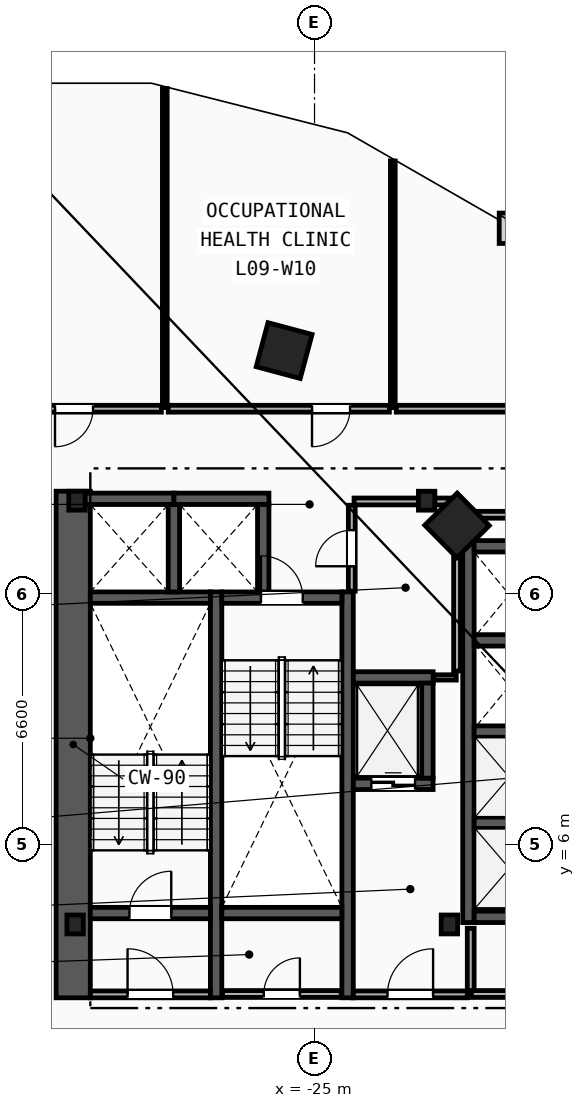
"""IFC4 building model, lengths in metres.
Left out: names, types, materials, properties, quantities, classifications, styles, units other than length and angle.
Written with IfcOpenShell. Run it as: python <this file> out.ifc"""

import sys

from ifc_helpers import new_model, si_unit, direction, frame, frame_2d, origin, origin_2d, place, context, subcontext, project, spatial, rectangle, i_section, extrude, element, fill, save


model = new_model("IFC4")
c1 = context("Model", 3, precision=1e-05, world=origin(), true_north=direction((0.0, 1.0)))
c2 = subcontext(c1, "Body", "Model", "MODEL_VIEW")
j1 = project(units=[si_unit("LENGTHUNIT", "METRE"), si_unit("PLANEANGLEUNIT", "RADIAN")], contexts=[c1])
p1 = place(None, origin())
s1 = spatial("IfcSite", under=j1, at=p1, CompositionType="ELEMENT")
p2 = place(p1, origin())
s2 = spatial("IfcBuilding", under=s1, at=p2, CompositionType="ELEMENT")
p3 = place(p2, frame((0.0, 0.0, 39.2)))
s3 = spatial("IfcBuildingStorey", under=s2, at=p3, CompositionType="ELEMENT", Elevation=39.2)
for number, where, z_axis, x_axis in (
    (1, (-31.3, 3.9, 0.0), (0.0, 0.0, 1.0), (1.0, 0.0, 0.0)),
    (2, (-21.45, 3.9, 0.0), (0.0, 0.0, 1.0), (1.0, 0.0, 0.0)),
    (3, (-22.05, 15.05, 0.0), (0.0, 0.0, 1.0), (1.0, 0.0, 0.0)),
    (4, (-31.25, 15.05, 0.0), (0.0, 0.0, 1.0), (1.0, 0.0, 0.0)),
):
    element("IfcColumn", number, at=place(p3, frame(where, z_axis=z_axis, x_axis=x_axis)), inside=s3, PredefinedType="COLUMN", context=c2, shape_type="SweptSolid", body=[
        extrude(i_section(OverallWidth=0.432, OverallDepth=0.498, WebThickness=0.056, FlangeThickness=0.089, FilletRadius=0.018, at=origin_2d()), origin(), (0.0, 0.0, 1.0), 3.8),
    ])
for number, where, z_axis, x_axis in (
    (5, (-21.25, 14.4, 0.0), (0.0, 0.0, 1.0), (-0.703, 0.711, 0.0)),
    (6, (-25.8, 19.0, 0.0), (0.0, 0.0, 1.0), (-0.966, 0.259, 0.0)),
):
    element("IfcColumn", number, at=place(p3, frame(where, z_axis=z_axis, x_axis=x_axis)), inside=s3, PredefinedType="COLUMN", context=c2, shape_type="SweptSolid", body=[
        extrude(rectangle(XDim=1.2, YDim=1.2, at=origin_2d()), origin(), (0.0, 0.0, 1.0), 3.8),
    ])
p4 = place(p3, frame((-31.35, 1.97, 0.0), z_axis=(0.0, 0.0, 1.0), x_axis=(0.0, 1.0, 0.0)))
e7 = element("IfcWall", 7, at=p4, inside=s3, PredefinedType="SHEAR", context=c2, shape_type="SweptSolid", body=[
    extrude(rectangle(XDim=13.33, YDim=0.9, at=frame_2d((6.665, 0.0))), origin(), (0.0, 0.0, 1.0), 3.5),
])
for number, where, z_axis, x_axis in (
    (8, (-27.59, 1.97, 0.0), (0.0, 0.0, 1.0), (0.0, 1.0, 0.0)),
    (9, (-24.13, 1.97, 0.0), (0.0, 0.0, 1.0), (0.0, 1.0, 0.0)),
):
    element("IfcWall", number, at=place(p3, frame(where, z_axis=z_axis, x_axis=x_axis)), inside=s3, PredefinedType="SHEAR", context=c2, shape_type="SweptSolid", body=[
        extrude(rectangle(XDim=10.68, YDim=0.3, at=frame_2d((5.34, 0.0))), origin(), (0.0, 0.0, 1.0), 3.5),
    ])
p5 = place(p3, frame((-30.9, 4.2, 0.0), z_axis=(0.0, 0.0, 1.0), x_axis=(1.0, 0.0, 0.0)))
e10 = element("IfcWall", 10, at=p5, inside=s3, PredefinedType="SHEAR", context=c2, shape_type="SweptSolid", body=[
    extrude(rectangle(XDim=3.16, YDim=0.3, at=frame_2d((1.58, 0.0))), origin(), (0.0, 0.0, 1.0), 3.5),
])
p6 = place(p5, frame((1.03, 0.0, 0.0)))
e11 = element("IfcOpeningElement", 11, at=p6, cuts=e10, PredefinedType="OPENING", context=c2, shape_type="SweptSolid", body=[
    extrude(rectangle(XDim=1.1, YDim=2.15, at=frame_2d((0.55, 1.075))), frame((0.0, 0.16, 0.0), z_axis=(0.0, -1.0, 0.0), x_axis=(1.0, 0.0, 0.0)), (0.0, 0.0, 1.0), 0.32),
])
p7 = place(p3, frame((-30.9, 12.5, 0.0), z_axis=(0.0, 0.0, 1.0), x_axis=(1.0, 0.0, 0.0)))
e12 = element("IfcWall", 12, at=p7, inside=s3, PredefinedType="SHEAR", context=c2, shape_type="SweptSolid", body=[
    extrude(rectangle(XDim=3.16, YDim=0.3, at=frame_2d((1.58, 0.0))), origin(), (0.0, 0.0, 1.0), 3.5),
])
p8 = place(p3, frame((-27.44, 12.5, 0.0), z_axis=(0.0, 0.0, 1.0), x_axis=(1.0, 0.0, 0.0)))
e13 = element("IfcWall", 13, at=p8, inside=s3, PredefinedType="SHEAR", context=c2, shape_type="SweptSolid", body=[
    extrude(rectangle(XDim=3.16, YDim=0.3, at=frame_2d((1.58, 0.0))), origin(), (0.0, 0.0, 1.0), 3.5),
])
p9 = place(p8, frame((1.03, 0.0, 0.0)))
e14 = element("IfcOpeningElement", 14, at=p9, cuts=e13, PredefinedType="OPENING", context=c2, shape_type="SweptSolid", body=[
    extrude(rectangle(XDim=1.1, YDim=2.15, at=frame_2d((0.55, 1.075))), frame((0.0, 0.16, 0.0), z_axis=(0.0, -1.0, 0.0), x_axis=(1.0, 0.0, 0.0)), (0.0, 0.0, 1.0), 0.32),
])
p10 = place(p3, frame((-27.44, 4.2, 0.0), z_axis=(0.0, 0.0, 1.0), x_axis=(1.0, 0.0, 0.0)))
e15 = element("IfcWall", 15, at=p10, inside=s3, PredefinedType="SHEAR", context=c2, shape_type="SweptSolid", body=[
    extrude(rectangle(XDim=3.16, YDim=0.3, at=frame_2d((1.58, 0.0))), origin(), (0.0, 0.0, 1.0), 3.5),
])
p11 = place(p3, frame((-20.89, 2.15, 0.0), z_axis=(0.0, 0.0, 1.0), x_axis=(0.0, 1.0, 0.0)))
e16 = element("IfcWall", 16, at=p11, inside=s3, PredefinedType="PARTITIONING", context=c2, shape_type="SweptSolid", body=[
    extrude(rectangle(XDim=1.65, YDim=0.18, at=frame_2d((0.825, 0.0))), origin(), (0.0, 0.0, 1.0), 3.5),
])
p12 = place(p3, frame((-23.98, 2.06, 0.0), z_axis=(0.0, 0.0, 1.0), x_axis=(1.0, 0.0, 0.0)))
e17 = element("IfcWall", 17, at=p12, inside=s3, PredefinedType="PARTITIONING", context=c2, shape_type="SweptSolid", body=[
    extrude(rectangle(XDim=3.0, YDim=0.18, at=frame_2d((1.5, 0.0))), origin(), (0.0, 0.0, 1.0), 3.5),
])
p13 = place(p12, frame((0.9, 0.0, 0.0)))
e18 = element("IfcOpeningElement", 18, at=p13, cuts=e17, PredefinedType="OPENING", context=c2, shape_type="SweptSolid", body=[
    extrude(rectangle(XDim=1.2, YDim=2.15, at=frame_2d((0.6, 1.075))), frame((0.0, 0.1, 0.0), z_axis=(0.0, -1.0, 0.0), x_axis=(1.0, 0.0, 0.0)), (0.0, 0.0, 1.0), 0.2),
])
p14 = place(p3, frame((-30.9, 2.06, 0.0), z_axis=(0.0, 0.0, 1.0), x_axis=(1.0, 0.0, 0.0)))
e19 = element("IfcWall", 19, at=p14, inside=s3, PredefinedType="PARTITIONING", context=c2, shape_type="SweptSolid", body=[
    extrude(rectangle(XDim=3.16, YDim=0.18, at=frame_2d((1.58, 0.0))), origin(), (0.0, 0.0, 1.0), 3.5),
])
p15 = place(p14, frame((0.98, 0.0, 0.0)))
e20 = element("IfcOpeningElement", 20, at=p15, cuts=e19, PredefinedType="OPENING", context=c2, shape_type="SweptSolid", body=[
    extrude(rectangle(XDim=1.2, YDim=2.15, at=frame_2d((0.6, 1.075))), frame((0.0, 0.1, 0.0), z_axis=(0.0, -1.0, 0.0), x_axis=(1.0, 0.0, 0.0)), (0.0, 0.0, 1.0), 0.2),
])
p16 = place(p3, frame((-23.98, 7.6, 0.0), z_axis=(0.0, 0.0, 1.0), x_axis=(1.0, 0.0, 0.0)))
e21 = element("IfcWall", 21, at=p16, inside=s3, PredefinedType="SHEAR", context=c2, shape_type="SweptSolid", body=[
    extrude(rectangle(XDim=2.1, YDim=0.3, at=frame_2d((1.05, 0.0))), origin(), (0.0, 0.0, 1.0), 3.5),
])
p17 = place(p16, frame((0.475, 0.0, 0.0)))
e22 = element("IfcOpeningElement", 22, at=p17, cuts=e21, PredefinedType="OPENING", context=c2, shape_type="SweptSolid", body=[
    extrude(rectangle(XDim=1.15, YDim=2.2, at=frame_2d((0.575, 1.1))), frame((0.0, 0.16, 0.0), z_axis=(0.0, -1.0, 0.0), x_axis=(1.0, 0.0, 0.0)), (0.0, 0.0, 1.0), 0.32),
])
p18 = place(p3, frame((-23.98, 10.4, 0.0), z_axis=(0.0, 0.0, 1.0), x_axis=(1.0, 0.0, 0.0)))
e23 = element("IfcWall", 23, at=p18, inside=s3, PredefinedType="SHEAR", context=c2, shape_type="SweptSolid", body=[
    extrude(rectangle(XDim=2.1, YDim=0.3, at=frame_2d((1.05, 0.0))), origin(), (0.0, 0.0, 1.0), 3.5),
])
for number, where, z_axis, x_axis in (
    (24, (-22.03, 7.75, 0.0), (0.0, 0.0, 1.0), (0.0, 1.0, 0.0)),
    (25, (-31.2, 15.1, 0.0), (0.0, 0.0, 1.0), (1.0, 0.0, 0.0)),
):
    element("IfcWall", number, at=place(p3, frame(where, z_axis=z_axis, x_axis=x_axis)), inside=s3, PredefinedType="SHEAR", context=c2, shape_type="SweptSolid", body=[
        extrude(rectangle(XDim=2.5, YDim=0.3, at=frame_2d((1.25, 0.0))), origin(), (0.0, 0.0, 1.0), 3.5),
    ])
p19 = place(p3, frame((-28.7, 12.65, 0.0), z_axis=(0.0, 0.0, 1.0), x_axis=(0.0, 1.0, 0.0)))
e26 = element("IfcWall", 26, at=p19, inside=s3, PredefinedType="SHEAR", context=c2, shape_type="SweptSolid", body=[
    extrude(rectangle(XDim=2.3, YDim=0.3, at=frame_2d((1.15, 0.0))), origin(), (0.0, 0.0, 1.0), 3.5),
])
p20 = place(p3, frame((-28.7, 15.1, 0.0), z_axis=(0.0, 0.0, 1.0), x_axis=(1.0, 0.0, 0.0)))
e27 = element("IfcWall", 27, at=p20, inside=s3, PredefinedType="SHEAR", context=c2, shape_type="SweptSolid", body=[
    extrude(rectangle(XDim=2.5, YDim=0.3, at=frame_2d((1.25, 0.0))), origin(), (0.0, 0.0, 1.0), 3.5),
])
p21 = place(p3, frame((-26.35, 12.65, 0.0), z_axis=(0.0, 0.0, 1.0), x_axis=(0.0, 1.0, 0.0)))
e28 = element("IfcWall", 28, at=p21, inside=s3, PredefinedType="SHEAR", context=c2, shape_type="SweptSolid", body=[
    extrude(rectangle(XDim=2.3, YDim=0.3, at=frame_2d((1.15, 0.0))), origin(), (0.0, 0.0, 1.0), 3.5),
])
p22 = place(p3, frame((-20.95, 3.95, 0.0), z_axis=(0.0, 0.0, 1.0), x_axis=(0.0, 1.0, 0.0)))
e29 = element("IfcWall", 29, at=p22, inside=s3, PredefinedType="SHEAR", context=c2, shape_type="SweptSolid", body=[
    extrude(rectangle(XDim=10.05, YDim=0.3, at=frame_2d((5.025, 0.0))), origin(), (0.0, 0.0, 1.0), 3.5),
])
for number, where, z_axis, x_axis in (
    (30, (-20.8, 4.1, 0.0), (0.0, 0.0, 1.0), (1.0, 0.0, 0.0)),
    (31, (-20.8, 13.85, 0.0), (0.0, 0.0, 1.0), (1.0, 0.0, 0.0)),
):
    element("IfcWall", number, at=place(p3, frame(where, z_axis=z_axis, x_axis=x_axis)), inside=s3, PredefinedType="SHEAR", context=c2, shape_type="SweptSolid", body=[
        extrude(rectangle(XDim=2.15, YDim=0.3, at=frame_2d((1.075, 0.0))), origin(), (0.0, 0.0, 1.0), 3.5),
    ])
for number, where, z_axis, x_axis in (
    (32, (-20.8, 6.575, 0.0), (0.0, 0.0, 1.0), (1.0, 0.0, 0.0)),
    (33, (-20.8, 8.975, 0.0), (0.0, 0.0, 1.0), (1.0, 0.0, 0.0)),
    (34, (-20.8, 11.375, 0.0), (0.0, 0.0, 1.0), (1.0, 0.0, 0.0)),
):
    element("IfcWall", number, at=place(p3, frame(where, z_axis=z_axis, x_axis=x_axis)), inside=s3, PredefinedType="SHEAR", context=c2, shape_type="SweptSolid", body=[
        extrude(rectangle(XDim=1.85, YDim=0.3, at=frame_2d((0.925, 0.0))), origin(), (0.0, 0.0, 1.0), 3.5),
    ])
p23 = place(p3, frame((-20.87, 2.07, 0.0), z_axis=(0.0, 0.0, 1.0), x_axis=(1.0, 0.0, 0.0)))
e35 = element("IfcWall", 35, at=p23, inside=s3, PredefinedType="PARTITIONING", context=c2, shape_type="SweptSolid", body=[
    extrude(rectangle(XDim=3.83, YDim=0.18, at=frame_2d((1.915, 0.0))), origin(), (0.0, 0.0, 1.0), 3.5),
])
p24 = place(p23, frame((1.44, 0.0, 0.0)))
e36 = element("IfcOpeningElement", 36, at=p24, cuts=e35, PredefinedType="OPENING", context=c2, shape_type="SweptSolid", body=[
    extrude(rectangle(XDim=0.95, YDim=2.1, at=frame_2d((0.475, 1.05))), frame((0.0, 0.1, 0.0), z_axis=(0.0, -1.0, 0.0), x_axis=(1.0, 0.0, 0.0)), (0.0, 0.0, 1.0), 0.2),
])
p25 = place(p3, frame((-21.86, 10.4, 0.0), z_axis=(0.0, 0.0, 1.0), x_axis=(1.0, 0.0, 0.0)))
e37 = element("IfcWall", 37, at=p25, inside=s3, PredefinedType="PARTITIONING", context=c2, shape_type="SweptSolid", body=[
    extrude(rectangle(XDim=0.59, YDim=0.14, at=frame_2d((0.295, 0.0))), origin(), (0.0, 0.0, 1.0), 3.5),
])
p26 = place(p3, frame((-21.25, 10.57, 0.0), z_axis=(0.0, 0.0, 1.0), x_axis=(0.0, 1.0, 0.0)))
e38 = element("IfcWall", 38, at=p26, inside=s3, PredefinedType="PARTITIONING", context=c2, shape_type="SweptSolid", body=[
    extrude(rectangle(XDim=4.36, YDim=0.18, at=frame_2d((2.18, 0.0))), origin(), (0.0, 0.0, 1.0), 3.5),
])
p27 = place(p3, frame((-23.96, 15.03, 0.0), z_axis=(0.0, 0.0, 1.0), x_axis=(1.0, 0.0, 0.0)))
e39 = element("IfcWall", 39, at=p27, inside=s3, PredefinedType="PARTITIONING", context=c2, shape_type="SweptSolid", body=[
    extrude(rectangle(XDim=2.61, YDim=0.18, at=frame_2d((1.305, 0.0))), origin(), (0.0, 0.0, 1.0), 2.573),
])
p28 = place(p3, frame((-27.42, 2.07, 0.0), z_axis=(0.0, 0.0, 1.0), x_axis=(1.0, 0.0, 0.0)))
e40 = element("IfcWall", 40, at=p28, inside=s3, PredefinedType="PARTITIONING", context=c2, shape_type="SweptSolid", body=[
    extrude(rectangle(XDim=3.12, YDim=0.18, at=frame_2d((1.56, 0.0))), origin(), (0.0, 0.0, 1.0), 3.5),
])
p29 = place(p28, frame((1.085, 0.0, 0.0)))
e41 = element("IfcOpeningElement", 41, at=p29, cuts=e40, PredefinedType="OPENING", context=c2, shape_type="SweptSolid", body=[
    extrude(rectangle(XDim=0.95, YDim=2.1, at=frame_2d((0.475, 1.05))), frame((0.0, 0.1, 0.0), z_axis=(0.0, -1.0, 0.0), x_axis=(1.0, 0.0, 0.0)), (0.0, 0.0, 1.0), 0.2),
])
p30 = place(p3, frame((-24.02, 12.67, 0.0), z_axis=(0.0, 0.0, 1.0), x_axis=(0.0, 1.0, 0.0)))
e42 = element("IfcWall", 42, at=p30, inside=s3, PredefinedType="PARTITIONING", context=c2, shape_type="SweptSolid", body=[
    extrude(rectangle(XDim=2.26, YDim=0.18, at=frame_2d((1.13, 0.0))), origin(), (0.0, 0.0, 1.0), 3.5),
])
p31 = place(p30, frame((0.655, 0.0, 0.0)))
e43 = element("IfcOpeningElement", 43, at=p31, cuts=e42, PredefinedType="OPENING", context=c2, shape_type="SweptSolid", body=[
    extrude(rectangle(XDim=0.95, YDim=2.1, at=frame_2d((0.475, 1.05))), frame((0.0, 0.1, 0.0), z_axis=(0.0, -1.0, 0.0), x_axis=(1.0, 0.0, 0.0)), (0.0, 0.0, 1.0), 0.2),
])
p32 = place(p3, frame((-28.94, 17.5, 0.0), z_axis=(0.0, 0.0, 1.0), x_axis=(0.0, 1.0, 0.0)))
e44 = element("IfcWall", 44, at=p32, inside=s3, PredefinedType="PARTITIONING", context=c2, shape_type="SweptSolid", body=[
    extrude(rectangle(XDim=8.395, YDim=0.125, at=frame_2d((4.197, 0.0))), origin(), (0.0, 0.0, 1.0), 3.5),
])
p33 = place(p3, frame((-22.94, 17.5, 0.0), z_axis=(0.0, 0.0, 1.0), x_axis=(0.0, 1.0, 0.0)))
e45 = element("IfcWall", 45, at=p33, inside=s3, PredefinedType="PARTITIONING", context=c2, shape_type="SweptSolid", body=[
    extrude(rectangle(XDim=6.49, YDim=0.125, at=frame_2d((3.245, 0.0))), origin(), (0.0, 0.0, 1.0), 3.5),
])
p34 = place(p3, frame((-16.822, 17.47, 0.0), z_axis=(0.0, 0.0, 1.0), x_axis=(-1.0, 0.0, 0.0)))
e46 = element("IfcWall", 46, at=p34, inside=s3, PredefinedType="PARTITIONING", context=c2, shape_type="SweptSolid", body=[
    extrude(rectangle(XDim=6.029, YDim=0.18, at=frame_2d((3.014, 0.0))), origin(), (0.0, 0.0, 1.0), 3.5),
])
p35 = place(p3, frame((-21.178, 14.68, 0.0), z_axis=(0.0, 0.0, 1.0), x_axis=(1.0, 0.0, 0.0)))
e47 = element("IfcWall", 47, at=p35, inside=s3, PredefinedType="PARTITIONING", context=c2, shape_type="SweptSolid", body=[
    extrude(rectangle(XDim=4.357, YDim=0.18, at=frame_2d((2.178, 0.0))), origin(), (0.0, 0.0, 1.0), 3.5),
])
p36 = place(p3, frame((-29.03, 17.47, 0.0), z_axis=(0.0, 0.0, 1.0), x_axis=(-1.0, 0.0, 0.0)))
e48 = element("IfcWall", 48, at=p36, inside=s3, PredefinedType="PARTITIONING", context=c2, shape_type="SweptSolid", body=[
    extrude(rectangle(XDim=4.598, YDim=0.18, at=frame_2d((2.299, 0.0))), origin(), (0.0, 0.0, 1.0), 3.5),
])
p37 = place(p36, frame((1.799, 0.0, 0.0)))
e49 = element("IfcOpeningElement", 49, at=p37, cuts=e48, PredefinedType="OPENING", context=c2, shape_type="SweptSolid", body=[
    extrude(rectangle(XDim=1.0, YDim=2.15, at=frame_2d((0.5, 1.075))), frame((0.0, 0.1, 0.0), z_axis=(0.0, -1.0, 0.0), x_axis=(1.0, 0.0, 0.0)), (0.0, 0.0, 1.0), 0.2),
])
p38 = place(p3, frame((-23.03, 17.47, 0.0), z_axis=(0.0, 0.0, 1.0), x_axis=(-1.0, 0.0, 0.0)))
e50 = element("IfcWall", 50, at=p38, inside=s3, PredefinedType="PARTITIONING", context=c2, shape_type="SweptSolid", body=[
    extrude(rectangle(XDim=5.82, YDim=0.18, at=frame_2d((2.91, 0.0))), origin(), (0.0, 0.0, 1.0), 3.5),
])
p39 = place(p38, frame((1.036, 0.0, 0.0)))
e51 = element("IfcOpeningElement", 51, at=p39, cuts=e50, PredefinedType="OPENING", context=c2, shape_type="SweptSolid", body=[
    extrude(rectangle(XDim=1.0, YDim=2.15, at=frame_2d((0.5, 1.075))), frame((0.0, 0.1, 0.0), z_axis=(0.0, -1.0, 0.0), x_axis=(1.0, 0.0, 0.0)), (0.0, 0.0, 1.0), 0.2),
])
p40 = place(p6, origin())
e52 = element("IfcDoor", 52, at=p40, inside=s3, OperationType="SINGLE_SWING_RIGHT", PredefinedType="DOOR", context=c2, shape_type="SweptSolid", body=[
    extrude(rectangle(XDim=1.1, YDim=2.15, at=frame_2d((0.55, 1.075))), frame((0.0, 0.025, 0.0), z_axis=(0.0, -1.0, 0.0), x_axis=(1.0, 0.0, 0.0)), (0.0, 0.0, 1.0), 0.05),
])
fill(e11, e52)
p41 = place(p9, origin())
e53 = element("IfcDoor", 53, at=p41, inside=s3, OperationType="SINGLE_SWING_LEFT", PredefinedType="DOOR", context=c2, shape_type="SweptSolid", body=[
    extrude(rectangle(XDim=1.1, YDim=2.15, at=frame_2d((0.55, 1.075))), frame((0.0, 0.025, 0.0), z_axis=(0.0, -1.0, 0.0), x_axis=(1.0, 0.0, 0.0)), (0.0, 0.0, 1.0), 0.05),
])
fill(e14, e53)
p42 = place(p13, origin())
e54 = element("IfcDoor", 54, at=p42, inside=s3, OperationType="SINGLE_SWING_RIGHT", PredefinedType="DOOR", context=c2, shape_type="SweptSolid", body=[
    extrude(rectangle(XDim=1.2, YDim=2.15, at=frame_2d((0.6, 1.075))), frame((0.0, 0.025, 0.0), z_axis=(0.0, -1.0, 0.0), x_axis=(1.0, 0.0, 0.0)), (0.0, 0.0, 1.0), 0.05),
])
fill(e18, e54)
p43 = place(p15, origin())
e55 = element("IfcDoor", 55, at=p43, inside=s3, OperationType="SINGLE_SWING_LEFT", PredefinedType="DOOR", context=c2, shape_type="SweptSolid", body=[
    extrude(rectangle(XDim=1.2, YDim=2.15, at=frame_2d((0.6, 1.075))), frame((0.0, 0.025, 0.0), z_axis=(0.0, -1.0, 0.0), x_axis=(1.0, 0.0, 0.0)), (0.0, 0.0, 1.0), 0.05),
])
fill(e20, e55)
p44 = place(p17, origin())
e56 = element("IfcDoor", 56, at=p44, inside=s3, OperationType="SLIDING_TO_LEFT", PredefinedType="TRAPDOOR", context=c2, shape_type="SweptSolid", body=[
    extrude(rectangle(XDim=1.15, YDim=2.2, at=frame_2d((0.575, 1.1))), frame((0.0, 0.025, 0.0), z_axis=(0.0, -1.0, 0.0), x_axis=(1.0, 0.0, 0.0)), (0.0, 0.0, 1.0), 0.05),
])
fill(e22, e56)
p45 = place(p39, origin())
e57 = element("IfcDoor", 57, at=p45, inside=s3, OperationType="SINGLE_SWING_RIGHT", PredefinedType="DOOR", context=c2, shape_type="SweptSolid", body=[
    extrude(rectangle(XDim=1.0, YDim=2.15, at=frame_2d((0.5, 1.075))), frame((0.0, 0.025, 0.0), z_axis=(0.0, -1.0, 0.0), x_axis=(1.0, 0.0, 0.0)), (0.0, 0.0, 1.0), 0.05),
])
fill(e51, e57)
p46 = place(p37, origin())
e58 = element("IfcDoor", 58, at=p46, inside=s3, OperationType="SINGLE_SWING_RIGHT", PredefinedType="DOOR", context=c2, shape_type="SweptSolid", body=[
    extrude(rectangle(XDim=1.0, YDim=2.15, at=frame_2d((0.5, 1.075))), frame((0.0, 0.025, 0.0), z_axis=(0.0, -1.0, 0.0), x_axis=(1.0, 0.0, 0.0)), (0.0, 0.0, 1.0), 0.05),
])
fill(e49, e58)
p47 = place(p29, origin())
e59 = element("IfcDoor", 59, at=p47, inside=s3, OperationType="SINGLE_SWING_RIGHT", PredefinedType="DOOR", context=c2, shape_type="SweptSolid", body=[
    extrude(rectangle(XDim=0.95, YDim=2.1, at=frame_2d((0.475, 1.05))), frame((0.0, 0.025, 0.0), z_axis=(0.0, -1.0, 0.0), x_axis=(1.0, 0.0, 0.0)), (0.0, 0.0, 1.0), 0.05),
])
fill(e41, e59)
p48 = place(p31, origin())
e60 = element("IfcDoor", 60, at=p48, inside=s3, OperationType="SINGLE_SWING_LEFT", PredefinedType="DOOR", context=c2, shape_type="SweptSolid", body=[
    extrude(rectangle(XDim=0.95, YDim=2.1, at=frame_2d((0.475, 1.05))), frame((0.0, 0.025, 0.0), z_axis=(0.0, -1.0, 0.0), x_axis=(1.0, 0.0, 0.0)), (0.0, 0.0, 1.0), 0.05),
])
fill(e43, e60)
save(model, sys.argv[1])
